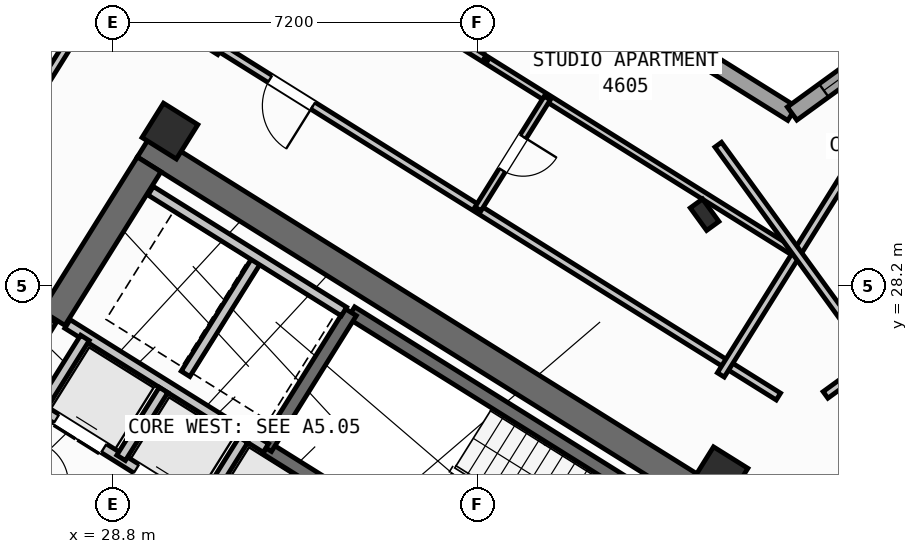
"""IFC4 building model, lengths in metres.
Left out: names, types, materials, properties, quantities, classifications, styles, units other than length and angle.
Written with IfcOpenShell. Run it as: python <this file> out.ifc"""

import sys

from ifc_helpers import new_model, si_unit, direction, frame, frame_2d, origin, origin_2d, place, context, subcontext, project, spatial, rectangle, hollow_rectangle, i_section, extrude, source, transform, mapped, element, fill, save


model = new_model("IFC4")
c1 = context("Model", 3, precision=1e-05, world=origin(), true_north=direction((0.0, 1.0)))
c2 = subcontext(c1, "Body", "Model", "MODEL_VIEW")
j1 = project(units=[si_unit("LENGTHUNIT", "METRE"), si_unit("PLANEANGLEUNIT", "RADIAN")], contexts=[c1])
p1 = place(None, origin())
s1 = spatial("IfcSite", under=j1, at=p1, CompositionType="ELEMENT")
p2 = place(p1, origin())
s2 = spatial("IfcBuilding", under=s1, at=p2, CompositionType="ELEMENT")
p3 = place(p2, frame((0.0, 0.0, 184.2)))
s3 = spatial("IfcBuildingStorey", under=s2, at=p3, CompositionType="ELEMENT", Elevation=184.2)
p4 = place(p3, frame((40.573, 24.01, 0.0), z_axis=(0.0, 0.0, 1.0), x_axis=(-0.848047359947, 0.529920442413, 0.0)))
e1 = element("IfcWall", 1, at=p4, inside=s3, PredefinedType="SHEAR", context=c2, shape_type="SweptSolid", body=[
    extrude(rectangle(XDim=13.14, YDim=0.55, at=frame_2d((6.57, 0.0))), origin(), (0.0, 0.0, 1.0), 3.35),
])
p5 = place(p3, frame((29.517, 30.594, 0.0), z_axis=(0.0, 0.0, 1.0), x_axis=(-0.529906864564, -0.848055844204, 0.0)))
e2 = element("IfcWall", 2, at=p5, inside=s3, PredefinedType="SHEAR", context=c2, shape_type="SweptSolid", body=[
    extrude(rectangle(XDim=3.575, YDim=0.55, at=frame_2d((1.788, 0.0))), origin(), (0.0, 0.0, 1.0), 3.35),
])
m1 = source(origin(), c2, "Body", "SweptSolid", [
    extrude(hollow_rectangle(XDim=0.8, YDim=0.8, WallThickness=0.032, at=origin_2d()), origin(), (0.0, 0.0, 1.0), 3.6),
])
for number, where, z_axis, x_axis in (
    (3, (40.783, 24.469, 0.0), (0.0, 0.0, 1.0), (-0.848, 0.53, 0.0)),
    (4, (29.928, 31.251, 0.0), (0.0, 0.0, 1.0), (-0.848, 0.53, 0.0)),
):
    element("IfcColumn", number, at=place(p3, frame(where, z_axis=z_axis, x_axis=x_axis)), inside=s3, PredefinedType="COLUMN", context=c2, shape_type="MappedRepresentation", body=[
        mapped(m1, transform((0.0, 0.0, 0.0), scale=1.0)),
    ])
m2 = source(origin(), c2, "Body", "SweptSolid", [
    extrude(i_section(OverallWidth=0.3, OverallDepth=0.55, WebThickness=0.015, FlangeThickness=0.029, at=origin_2d()), origin(), (0.0, 0.0, 1.0), 3.6),
])
p6 = place(p3, frame((40.479, 29.601, 0.0), z_axis=(0.0, 0.0, 1.0), x_axis=(0.809016994375, 0.587785252292, 0.0)))
e5 = element("IfcColumn", 5, at=p6, inside=s3, PredefinedType="COLUMN", context=c2, shape_type="MappedRepresentation", body=[
    mapped(m2, transform((0.0, 0.0, 0.0), scale=1.0)),
])
p7 = place(p3, frame((31.76, 12.183, 0.0), z_axis=(0.0, 0.0, 1.0), x_axis=(-0.848047074256, 0.529920899612, 0.0)))
e6 = element("IfcWall", 6, at=p7, inside=s3, PredefinedType="STANDARD", context=c2, shape_type="SweptSolid", body=[
    extrude(rectangle(XDim=30.652, YDim=0.32, at=frame_2d((15.326, 0.0))), origin(), (0.0, 0.0, 1.0), 3.35),
])
p8 = place(p7, frame((15.166, 0.0, 0.0)))
e7 = element("IfcOpeningElement", 7, at=p8, cuts=e6, PredefinedType="OPENING", context=c2, shape_type="SweptSolid", body=[
    extrude(rectangle(XDim=1.2, YDim=2.15, at=frame_2d((0.6, 1.075))), frame((0.0, 0.17, 0.0), z_axis=(0.0, -1.0, 0.0), x_axis=(1.0, 0.0, 0.0)), (0.0, 0.0, 1.0), 0.34),
])
p9 = place(p7, frame((2.015, 0.0, 0.8)))
e8 = element("IfcOpeningElement", 8, at=p9, cuts=e6, PredefinedType="OPENING", context=c2, shape_type="SweptSolid", body=[
    extrude(rectangle(XDim=2.1, YDim=1.55, at=frame_2d((1.05, 0.775))), frame((0.0, 0.17, 0.0), z_axis=(0.0, -1.0, 0.0), x_axis=(1.0, 0.0, 0.0)), (0.0, 0.0, 1.0), 0.34),
])
p10 = place(p7, frame((7.244, 0.0, 0.8)))
e9 = element("IfcOpeningElement", 9, at=p10, cuts=e6, PredefinedType="OPENING", context=c2, shape_type="SweptSolid", body=[
    extrude(rectangle(XDim=2.1, YDim=1.55, at=frame_2d((1.05, 0.775))), frame((0.0, 0.17, 0.0), z_axis=(0.0, -1.0, 0.0), x_axis=(1.0, 0.0, 0.0)), (0.0, 0.0, 1.0), 0.34),
])
p11 = place(p7, frame((12.623, 0.0, 1.0)))
e10 = element("IfcOpeningElement", 10, at=p11, cuts=e6, PredefinedType="OPENING", context=c2, shape_type="SweptSolid", body=[
    extrude(rectangle(XDim=0.9, YDim=1.25, at=frame_2d((0.45, 0.625))), frame((0.0, 0.17, 0.0), z_axis=(0.0, -1.0, 0.0), x_axis=(1.0, 0.0, 0.0)), (0.0, 0.0, 1.0), 0.34),
])
p12 = place(p7, frame((19.565, 0.0, 0.95)))
e11 = element("IfcOpeningElement", 11, at=p12, cuts=e6, PredefinedType="OPENING", context=c2, shape_type="SweptSolid", body=[
    extrude(rectangle(XDim=1.2, YDim=1.4, at=frame_2d((0.6, 0.7))), frame((0.0, 0.17, 0.0), z_axis=(0.0, -1.0, 0.0), x_axis=(1.0, 0.0, 0.0)), (0.0, 0.0, 1.0), 0.34),
])
p13 = place(p7, frame((25.983, 0.0, 1.0)))
e12 = element("IfcOpeningElement", 12, at=p13, cuts=e6, PredefinedType="OPENING", context=c2, shape_type="SweptSolid", body=[
    extrude(rectangle(XDim=0.9, YDim=1.25, at=frame_2d((0.45, 0.625))), frame((0.0, 0.17, 0.0), z_axis=(0.0, -1.0, 0.0), x_axis=(1.0, 0.0, 0.0)), (0.0, 0.0, 1.0), 0.34),
])
p14 = place(p7, frame((28.433, 0.0, 1.0)))
e13 = element("IfcOpeningElement", 13, at=p14, cuts=e6, PredefinedType="OPENING", context=c2, shape_type="SweptSolid", body=[
    extrude(rectangle(XDim=0.9, YDim=1.25, at=frame_2d((0.45, 0.625))), frame((0.0, 0.17, 0.0), z_axis=(0.0, -1.0, 0.0), x_axis=(1.0, 0.0, 0.0)), (0.0, 0.0, 1.0), 0.34),
])
p15 = place(p3, frame((17.424, 47.083, 0.0), z_axis=(0.0, 0.0, 1.0), x_axis=(0.848049927979, -0.529916332693, 0.0)))
e14 = element("IfcWall", 14, at=p15, inside=s3, PredefinedType="STANDARD", context=c2, shape_type="SweptSolid", body=[
    extrude(rectangle(XDim=29.223, YDim=0.32, at=frame_2d((14.612, 0.0))), origin(), (0.0, 0.0, 1.0), 3.35),
])
p16 = place(p15, frame((3.764, 0.0, 0.0)))
e15 = element("IfcOpeningElement", 15, at=p16, cuts=e14, PredefinedType="OPENING", context=c2, shape_type="SweptSolid", body=[
    extrude(rectangle(XDim=1.05, YDim=2.15, at=frame_2d((0.525, 1.075))), frame((0.0, 0.17, 0.0), z_axis=(0.0, -1.0, 0.0), x_axis=(1.0, 0.0, 0.0)), (0.0, 0.0, 1.0), 0.34),
])
p17 = place(p15, frame((8.344, 0.0, 0.8)))
e16 = element("IfcOpeningElement", 16, at=p17, cuts=e14, PredefinedType="OPENING", context=c2, shape_type="SweptSolid", body=[
    extrude(rectangle(XDim=2.1, YDim=1.55, at=frame_2d((1.05, 0.775))), frame((0.0, 0.17, 0.0), z_axis=(0.0, -1.0, 0.0), x_axis=(1.0, 0.0, 0.0)), (0.0, 0.0, 1.0), 0.34),
])
p18 = place(p15, frame((13.589, 0.0, 0.85)))
e17 = element("IfcOpeningElement", 17, at=p18, cuts=e14, PredefinedType="OPENING", context=c2, shape_type="SweptSolid", body=[
    extrude(rectangle(XDim=1.8, YDim=1.5, at=frame_2d((0.9, 0.75))), frame((0.0, 0.17, 0.0), z_axis=(0.0, -1.0, 0.0), x_axis=(1.0, 0.0, 0.0)), (0.0, 0.0, 1.0), 0.34),
])
p19 = place(p15, frame((17.104, 0.0, 0.95)))
e18 = element("IfcOpeningElement", 18, at=p19, cuts=e14, PredefinedType="OPENING", context=c2, shape_type="SweptSolid", body=[
    extrude(rectangle(XDim=1.2, YDim=1.4, at=frame_2d((0.6, 0.7))), frame((0.0, 0.17, 0.0), z_axis=(0.0, -1.0, 0.0), x_axis=(1.0, 0.0, 0.0)), (0.0, 0.0, 1.0), 0.34),
])
p20 = place(p15, frame((21.214, 0.0, 0.95)))
e19 = element("IfcOpeningElement", 19, at=p20, cuts=e14, PredefinedType="OPENING", context=c2, shape_type="SweptSolid", body=[
    extrude(rectangle(XDim=1.2, YDim=1.4, at=frame_2d((0.6, 0.7))), frame((0.0, 0.17, 0.0), z_axis=(0.0, -1.0, 0.0), x_axis=(1.0, 0.0, 0.0)), (0.0, 0.0, 1.0), 0.34),
])
p21 = place(p15, frame((25.853, 0.0, 0.95)))
e20 = element("IfcOpeningElement", 20, at=p21, cuts=e14, PredefinedType="OPENING", context=c2, shape_type="SweptSolid", body=[
    extrude(rectangle(XDim=1.2, YDim=1.4, at=frame_2d((0.6, 0.7))), frame((0.0, 0.17, 0.0), z_axis=(0.0, -1.0, 0.0), x_axis=(1.0, 0.0, 0.0)), (0.0, 0.0, 1.0), 0.34),
])
p22 = place(p3, frame((42.207, 31.597, 0.0), z_axis=(0.0, 0.0, 1.0), x_axis=(0.809020333377, 0.587780656523, 0.0)))
e21 = element("IfcWall", 21, at=p22, inside=s3, PredefinedType="STANDARD", context=c2, shape_type="SweptSolid", body=[
    extrude(rectangle(XDim=15.223, YDim=0.32, at=frame_2d((7.611, 0.0))), origin(), (0.0, 0.0, 1.0), 3.35),
])
p23 = place(p22, frame((12.82, 0.0, 0.0)))
e22 = element("IfcOpeningElement", 22, at=p23, cuts=e21, PredefinedType="OPENING", context=c2, shape_type="SweptSolid", body=[
    extrude(rectangle(XDim=1.05, YDim=2.15, at=frame_2d((0.525, 1.075))), frame((0.0, 0.17, 0.0), z_axis=(0.0, -1.0, 0.0), x_axis=(1.0, 0.0, 0.0)), (0.0, 0.0, 1.0), 0.34),
])
p24 = place(p22, frame((0.775, 0.0, 0.85)))
e23 = element("IfcOpeningElement", 23, at=p24, cuts=e21, PredefinedType="OPENING", context=c2, shape_type="SweptSolid", body=[
    extrude(rectangle(XDim=1.8, YDim=1.5, at=frame_2d((0.9, 0.75))), frame((0.0, 0.17, 0.0), z_axis=(0.0, -1.0, 0.0), x_axis=(1.0, 0.0, 0.0)), (0.0, 0.0, 1.0), 0.34),
])
p25 = place(p22, frame((5.544, 0.0, 0.85)))
e24 = element("IfcOpeningElement", 24, at=p25, cuts=e21, PredefinedType="OPENING", context=c2, shape_type="SweptSolid", body=[
    extrude(rectangle(XDim=1.8, YDim=1.5, at=frame_2d((0.9, 0.75))), frame((0.0, 0.17, 0.0), z_axis=(0.0, -1.0, 0.0), x_axis=(1.0, 0.0, 0.0)), (0.0, 0.0, 1.0), 0.34),
])
p26 = place(p22, frame((10.219, 0.0, 1.0)))
e25 = element("IfcOpeningElement", 25, at=p26, cuts=e21, PredefinedType="OPENING", context=c2, shape_type="SweptSolid", body=[
    extrude(rectangle(XDim=0.9, YDim=1.25, at=frame_2d((0.45, 0.625))), frame((0.0, 0.17, 0.0), z_axis=(0.0, -1.0, 0.0), x_axis=(1.0, 0.0, 0.0)), (0.0, 0.0, 1.0), 0.34),
])
p27 = place(p3, frame((39.721, 23.788, 0.0), z_axis=(0.0, 0.0, 1.0), x_axis=(-0.848054434086, 0.529909121291, 0.0)))
e26 = element("IfcWall", 26, at=p27, inside=s3, PredefinedType="SHEAR", context=c2, shape_type="SweptSolid", body=[
    extrude(rectangle(XDim=7.33, YDim=0.26, at=frame_2d((3.665, 0.0))), origin(), (0.0, 0.0, 1.0), 3.35),
])
p28 = place(p3, frame((38.046, 21.108, 0.0), z_axis=(0.0, 0.0, 1.0), x_axis=(-0.848054434086, 0.529909121291, 0.0)))
e27 = element("IfcWall", 27, at=p28, inside=s3, PredefinedType="SHEAR", context=c2, shape_type="SweptSolid", body=[
    extrude(rectangle(XDim=7.33, YDim=0.26, at=frame_2d((3.665, 0.0))), origin(), (0.0, 0.0, 1.0), 3.35),
])
p29 = place(p28, frame((0.22, 0.0, 0.0)))
e28 = element("IfcOpeningElement", 28, at=p29, cuts=e27, PredefinedType="OPENING", context=c2, shape_type="SweptSolid", body=[
    extrude(rectangle(XDim=1.1, YDim=2.1, at=frame_2d((0.55, 1.05))), frame((0.0, 0.14, 0.0), z_axis=(0.0, -1.0, 0.0), x_axis=(1.0, 0.0, 0.0)), (0.0, 0.0, 1.0), 0.28),
])
p30 = place(p3, frame((33.496, 27.677, 0.0), z_axis=(0.0, 0.0, 1.0), x_axis=(-0.529908658664, -0.84805472316, 0.0)))
e29 = element("IfcWall", 29, at=p30, inside=s3, PredefinedType="SHEAR", context=c2, shape_type="SweptSolid", body=[
    extrude(rectangle(XDim=3.16, YDim=0.26, at=frame_2d((1.58, 0.0))), origin(), (0.0, 0.0, 1.0), 3.35),
])
p31 = place(p3, frame((31.822, 24.998, 0.0), z_axis=(0.0, 0.0, 1.0), x_axis=(-0.848036912365, 0.52993716162, 0.0)))
e30 = element("IfcWall", 30, at=p31, inside=s3, PredefinedType="STANDARD", context=c2, shape_type="SweptSolid", body=[
    extrude(rectangle(XDim=4.618, YDim=0.2, at=frame_2d((2.309, 0.0))), origin(), (0.0, 0.0, 1.0), 3.34),
])
p32 = place(p3, frame((32.108, 22.814, 0.0), z_axis=(0.0, 0.0, 1.0), x_axis=(-0.848042229521, 0.529928652696, 0.0)))
e31 = element("IfcWall", 31, at=p32, inside=s3, PredefinedType="STANDARD", context=c2, shape_type="SweptSolid", body=[
    extrude(rectangle(XDim=5.62, YDim=0.2, at=frame_2d((2.81, 0.0))), origin(), (0.0, 0.0, 1.0), 3.34),
])
p33 = place(p32, frame((0.39, 0.0, 0.0)))
e32 = element("IfcOpeningElement", 32, at=p33, cuts=e31, PredefinedType="OPENING", context=c2, shape_type="SweptSolid", body=[
    extrude(rectangle(XDim=1.1, YDim=2.15, at=frame_2d((0.55, 1.075))), frame((0.0, 0.11, 0.0), z_axis=(0.0, -1.0, 0.0), x_axis=(1.0, 0.0, 0.0)), (0.0, 0.0, 1.0), 0.22),
])
p34 = place(p32, frame((2.25, 0.0, 0.0)))
e33 = element("IfcOpeningElement", 33, at=p34, cuts=e31, PredefinedType="OPENING", context=c2, shape_type="SweptSolid", body=[
    extrude(rectangle(XDim=1.1, YDim=2.15, at=frame_2d((0.55, 1.075))), frame((0.0, 0.11, 0.0), z_axis=(0.0, -1.0, 0.0), x_axis=(1.0, 0.0, 0.0)), (0.0, 0.0, 1.0), 0.22),
])
p35 = place(p32, frame((4.11, 0.0, 0.0)))
e34 = element("IfcOpeningElement", 34, at=p35, cuts=e31, PredefinedType="OPENING", context=c2, shape_type="SweptSolid", body=[
    extrude(rectangle(XDim=1.1, YDim=2.15, at=frame_2d((0.55, 1.075))), frame((0.0, 0.11, 0.0), z_axis=(0.0, -1.0, 0.0), x_axis=(1.0, 0.0, 0.0)), (0.0, 0.0, 1.0), 0.22),
])
p36 = place(p3, frame((28.25, 27.17, 0.0), z_axis=(0.0, 0.0, 1.0), x_axis=(-0.529905827651, -0.848056492117, 0.0)))
e35 = element("IfcWall", 35, at=p36, inside=s3, PredefinedType="STANDARD", context=c2, shape_type="SweptSolid", body=[
    extrude(rectangle(XDim=1.65, YDim=0.2, at=frame_2d((0.825, 0.0))), origin(), (0.0, 0.0, 1.0), 3.34),
])
p37 = place(p3, frame((31.645, 28.716, 0.0), z_axis=(0.0, 0.0, 1.0), x_axis=(-0.52986693015, -0.848080795876, 0.0)))
e36 = element("IfcWall", 36, at=p37, inside=s3, PredefinedType="STANDARD", context=c2, shape_type="SweptSolid", body=[
    extrude(rectangle(XDim=2.66, YDim=0.2, at=frame_2d((1.33, 0.0))), origin(), (0.0, 0.0, 1.0), 3.34),
])
p38 = place(p3, frame((33.363, 27.69, 0.0), z_axis=(0.0, 0.0, 1.0), x_axis=(-0.848047090064, 0.529920874315, 0.0)))
e37 = element("IfcWall", 37, at=p38, inside=s3, PredefinedType="STANDARD", context=c2, shape_type="SweptSolid", body=[
    extrude(rectangle(XDim=4.498, YDim=0.2, at=frame_2d((2.249, 0.0))), origin(), (0.0, 0.0, 1.0), 3.34),
])
for number, where, z_axis, x_axis in (
    (38, (31.379, 25.156, 0.0), (0.0, 0.0, 1.0), (-0.53, -0.848, 0.0)),
    (39, (29.801, 26.142, 0.0), (0.0, 0.0, 1.0), (-0.53, -0.848, 0.0)),
):
    element("IfcWall", number, at=place(p3, frame(where, z_axis=z_axis, x_axis=x_axis)), inside=s3, PredefinedType="STANDARD", context=c2, shape_type="SweptSolid", body=[
        extrude(rectangle(XDim=1.58, YDim=0.2, at=frame_2d((0.79, 0.0))), origin(), (0.0, 0.0, 1.0), 3.34),
    ])
p39 = place(p3, frame((31.525, 21.504, 0.0), z_axis=(0.0, 0.0, 1.0), x_axis=(-0.848040211232, 0.529931882541, 0.0)))
e40 = element("IfcWall", 40, at=p39, inside=s3, PredefinedType="STANDARD", context=c2, shape_type="SweptSolid", body=[
    extrude(rectangle(XDim=6.218, YDim=0.2, at=frame_2d((3.109, 0.0))), origin(), (0.0, 0.0, 1.0), 3.34),
])
p40 = place(p39, frame((4.4, 0.0, 0.0)))
e41 = element("IfcOpeningElement", 41, at=p40, cuts=e40, PredefinedType="OPENING", context=c2, shape_type="SweptSolid", body=[
    extrude(rectangle(XDim=0.86, YDim=2.05, at=frame_2d((0.43, 1.025))), frame((0.0, 0.11, 0.0), z_axis=(0.0, -1.0, 0.0), x_axis=(1.0, 0.0, 0.0)), (0.0, 0.0, 1.0), 0.22),
])
p41 = place(p39, frame((1.45, 0.0, 0.0)))
e42 = element("IfcOpeningElement", 42, at=p41, cuts=e40, PredefinedType="OPENING", context=c2, shape_type="SweptSolid", body=[
    extrude(rectangle(XDim=0.86, YDim=2.05, at=frame_2d((0.43, 1.025))), frame((0.0, 0.11, 0.0), z_axis=(0.0, -1.0, 0.0), x_axis=(1.0, 0.0, 0.0)), (0.0, 0.0, 1.0), 0.22),
])
p42 = place(p3, frame((27.596, 27.52, 0.0), z_axis=(0.0, 0.0, 1.0), x_axis=(-0.529865479138, -0.848081702443, 0.0)))
e43 = element("IfcWall", 43, at=p42, inside=s3, PredefinedType="STANDARD", context=c2, shape_type="SweptSolid", body=[
    extrude(rectangle(XDim=2.96, YDim=0.2, at=frame_2d((1.48, 0.0))), origin(), (0.0, 0.0, 1.0), 3.34),
])
p43 = place(p42, frame((1.76, 0.0, 0.0)))
e44 = element("IfcOpeningElement", 44, at=p43, cuts=e43, PredefinedType="OPENING", context=c2, shape_type="SweptSolid", body=[
    extrude(rectangle(XDim=0.86, YDim=2.05, at=frame_2d((0.43, 1.025))), frame((0.0, 0.11, 0.0), z_axis=(0.0, -1.0, 0.0), x_axis=(1.0, 0.0, 0.0)), (0.0, 0.0, 1.0), 0.22),
])
p44 = place(p3, frame((30.914, 32.829, 0.0), z_axis=(0.0, 0.0, 1.0), x_axis=(-0.848008813643, 0.529982124211, 0.0)))
e45 = element("IfcWall", 45, at=p44, inside=s3, PredefinedType="PARTITIONING", context=c2, shape_type="SweptSolid", body=[
    extrude(rectangle(XDim=2.61, YDim=0.16, at=frame_2d((1.305, 0.0))), origin(), (0.0, 0.0, 1.0), 3.34),
])
p45 = place(p3, frame((31.239, 38.274, 0.0), z_axis=(0.0, 0.0, 1.0), x_axis=(-0.529914125013, -0.848051307476, 0.0)))
e46 = element("IfcWall", 46, at=p45, inside=s3, PredefinedType="PARTITIONING", context=c2, shape_type="SweptSolid", body=[
    extrude(rectangle(XDim=10.35, YDim=0.16, at=frame_2d((5.175, 0.0))), origin(), (0.0, 0.0, 1.0), 3.34),
])
p46 = place(p3, frame((41.936, 26.012, 0.0), z_axis=(0.0, 0.0, 1.0), x_axis=(-0.848051154596, 0.529914369676, 0.0)))
e47 = element("IfcWall", 47, at=p46, inside=s3, PredefinedType="PARTITIONING", context=c2, shape_type="SweptSolid", body=[
    extrude(rectangle(XDim=15.57, YDim=0.16, at=frame_2d((7.785, 0.0))), origin(), (0.0, 0.0, 1.0), 3.34),
])
p47 = place(p46, frame((10.83, 0.0, 0.0)))
e48 = element("IfcOpeningElement", 48, at=p47, cuts=e47, PredefinedType="OPENING", context=c2, shape_type="SweptSolid", body=[
    extrude(rectangle(XDim=1.0, YDim=2.1, at=frame_2d((0.5, 1.05))), frame((0.0, 0.09, 0.0), z_axis=(0.0, -1.0, 0.0), x_axis=(1.0, 0.0, 0.0)), (0.0, 0.0, 1.0), 0.18),
])
p48 = place(p3, frame((43.704, 31.086, 0.0), z_axis=(0.0, 0.0, 1.0), x_axis=(-0.529906828443, -0.848055866774, 0.0)))
e49 = element("IfcWall", 49, at=p48, inside=s3, PredefinedType="PARTITIONING", context=c2, shape_type="SweptSolid", body=[
    extrude(rectangle(XDim=5.48, YDim=0.16, at=frame_2d((2.74, 0.0))), origin(), (0.0, 0.0, 1.0), 3.34),
])
p49 = place(p3, frame((42.226, 28.873, 0.0), z_axis=(0.0, 0.0, 1.0), x_axis=(-0.848049134363, 0.529917602752, 0.0)))
e50 = element("IfcWall", 50, at=p49, inside=s3, PredefinedType="PLUMBINGWALL", context=c2, shape_type="SweptSolid", body=[
    extrude(rectangle(XDim=14.3, YDim=0.14, at=frame_2d((7.15, 0.0))), origin(), (0.0, 0.0, 1.0), 3.34),
])
p50 = place(p49, frame((9.57, 0.0, 0.0)))
e51 = element("IfcOpeningElement", 51, at=p50, cuts=e50, PredefinedType="OPENING", context=c2, shape_type="SweptSolid", body=[
    extrude(rectangle(XDim=0.92, YDim=2.08, at=frame_2d((0.46, 1.04))), frame((0.0, 0.08, 0.0), z_axis=(0.0, -1.0, 0.0), x_axis=(1.0, 0.0, 0.0)), (0.0, 0.0, 1.0), 0.16),
])
p51 = place(p3, frame((37.375, 31.904, 0.0), z_axis=(0.0, 0.0, 1.0), x_axis=(-0.529913878929, -0.848051461244, 0.0)))
e52 = element("IfcWall", 52, at=p51, inside=s3, PredefinedType="PLUMBINGWALL", context=c2, shape_type="SweptSolid", body=[
    extrude(rectangle(XDim=2.58, YDim=0.14, at=frame_2d((1.29, 0.0))), origin(), (0.0, 0.0, 1.0), 3.34),
])
p52 = place(p51, frame((0.9, 0.0, 0.0)))
e53 = element("IfcOpeningElement", 53, at=p52, cuts=e52, PredefinedType="OPENING", context=c2, shape_type="SweptSolid", body=[
    extrude(rectangle(XDim=0.78, YDim=2.05, at=frame_2d((0.39, 1.025))), frame((0.0, 0.08, 0.0), z_axis=(0.0, -1.0, 0.0), x_axis=(1.0, 0.0, 0.0)), (0.0, 0.0, 1.0), 0.16),
])
p53 = place(p3, frame((42.866, 26.044, 0.0), z_axis=(0.0, 0.0, 1.0), x_axis=(0.809020254154, 0.587780765566, 0.0)))
e54 = element("IfcWall", 54, at=p53, inside=s3, PredefinedType="PARTITIONING", context=c2, shape_type="SweptSolid", body=[
    extrude(rectangle(XDim=14.67, YDim=0.16, at=frame_2d((7.335, 0.0))), origin(), (0.0, 0.0, 1.0), 3.34),
])
p54 = place(p53, frame((3.215, 0.0, 0.0)))
e55 = element("IfcOpeningElement", 55, at=p54, cuts=e54, PredefinedType="OPENING", context=c2, shape_type="SweptSolid", body=[
    extrude(rectangle(XDim=1.0, YDim=2.1, at=frame_2d((0.5, 1.05))), frame((0.0, 0.09, 0.0), z_axis=(0.0, -1.0, 0.0), x_axis=(1.0, 0.0, 0.0)), (0.0, 0.0, 1.0), 0.18),
])
p55 = place(p53, frame((9.915, 0.0, 0.0)))
e56 = element("IfcOpeningElement", 56, at=p55, cuts=e54, PredefinedType="OPENING", context=c2, shape_type="SweptSolid", body=[
    extrude(rectangle(XDim=1.0, YDim=2.1, at=frame_2d((0.5, 1.05))), frame((0.0, 0.09, 0.0), z_axis=(0.0, -1.0, 0.0), x_axis=(1.0, 0.0, 0.0)), (0.0, 0.0, 1.0), 0.18),
])
p56 = place(p3, frame((43.969, 26.55, 0.0), z_axis=(0.0, 0.0, 1.0), x_axis=(-0.587776919386, 0.80902304852, 0.0)))
e57 = element("IfcWall", 57, at=p56, inside=s3, PredefinedType="PARTITIONING", context=c2, shape_type="SweptSolid", body=[
    extrude(rectangle(XDim=5.48, YDim=0.16, at=frame_2d((2.74, 0.0))), origin(), (0.0, 0.0, 1.0), 3.34),
])
m3 = source(origin(), c2, "Body", "SweptSolid", [
    extrude(rectangle(XDim=1.2, YDim=1.4, at=frame_2d((0.6, 0.7))), frame((0.0, 0.03, 0.0), z_axis=(0.0, -1.0, 0.0), x_axis=(1.0, 0.0, 0.0)), (0.0, 0.0, 1.0), 0.06),
])
p57 = place(p21, origin())
e58 = element("IfcWindow", 58, at=p57, inside=s3, PartitioningType="SINGLE_PANEL", PredefinedType="WINDOW", context=c2, shape_type="MappedRepresentation", body=[
    mapped(m3, transform((0.0, 0.0, 0.0), scale=1.0)),
])
fill(e20, e58)
m4 = source(origin(), c2, "Body", "SweptSolid", [
    extrude(rectangle(XDim=1.8, YDim=1.5, at=frame_2d((0.9, 0.75))), frame((0.0, 0.03, 0.0), z_axis=(0.0, -1.0, 0.0), x_axis=(1.0, 0.0, 0.0)), (0.0, 0.0, 1.0), 0.06),
])
p58 = place(p24, origin())
e59 = element("IfcWindow", 59, at=p58, inside=s3, PartitioningType="SINGLE_PANEL", PredefinedType="WINDOW", context=c2, shape_type="MappedRepresentation", body=[
    mapped(m4, transform((0.0, 0.0, 0.0), scale=1.0)),
])
fill(e23, e59)
m5 = source(origin(), c2, "Body", "SweptSolid", [
    extrude(rectangle(XDim=1.1, YDim=2.15, at=frame_2d((0.55, 1.075))), frame((0.0, 0.025, 0.0), z_axis=(0.0, -1.0, 0.0), x_axis=(1.0, 0.0, 0.0)), (0.0, 0.0, 1.0), 0.05),
])
p59 = place(p34, origin())
e60 = element("IfcDoor", 60, at=p59, inside=s3, OperationType="DOUBLE_DOOR_SLIDING", PredefinedType="DOOR", context=c2, shape_type="MappedRepresentation", body=[
    mapped(m5, transform((0.0, 0.0, 0.0), scale=1.0)),
])
fill(e33, e60)
p60 = place(p35, origin())
e61 = element("IfcDoor", 61, at=p60, inside=s3, OperationType="DOUBLE_DOOR_SLIDING", PredefinedType="DOOR", context=c2, shape_type="MappedRepresentation", body=[
    mapped(m5, transform((0.0, 0.0, 0.0), scale=1.0)),
])
fill(e34, e61)
m6 = source(origin(), c2, "Body", "SweptSolid", [
    extrude(rectangle(XDim=1.0, YDim=2.1, at=frame_2d((0.5, 1.05))), frame((0.0, 0.025, 0.0), z_axis=(0.0, -1.0, 0.0), x_axis=(1.0, 0.0, 0.0)), (0.0, 0.0, 1.0), 0.05),
])
p61 = place(p47, origin())
e62 = element("IfcDoor", 62, at=p61, inside=s3, OperationType="SINGLE_SWING_LEFT", PredefinedType="DOOR", context=c2, shape_type="MappedRepresentation", body=[
    mapped(m6, transform((0.0, 0.0, 0.0), scale=1.0)),
])
fill(e48, e62)
m7 = source(origin(), c2, "Body", "SweptSolid", [
    extrude(rectangle(XDim=0.78, YDim=2.05, at=frame_2d((0.39, 1.025))), frame((0.0, 0.025, 0.0), z_axis=(0.0, -1.0, 0.0), x_axis=(1.0, 0.0, 0.0)), (0.0, 0.0, 1.0), 0.05),
])
p62 = place(p52, origin())
e63 = element("IfcDoor", 63, at=p62, inside=s3, OperationType="SINGLE_SWING_LEFT", PredefinedType="DOOR", context=c2, shape_type="MappedRepresentation", body=[
    mapped(m7, transform((0.0, 0.0, 0.0), scale=1.0)),
])
fill(e53, e63)
save(model, sys.argv[1])
